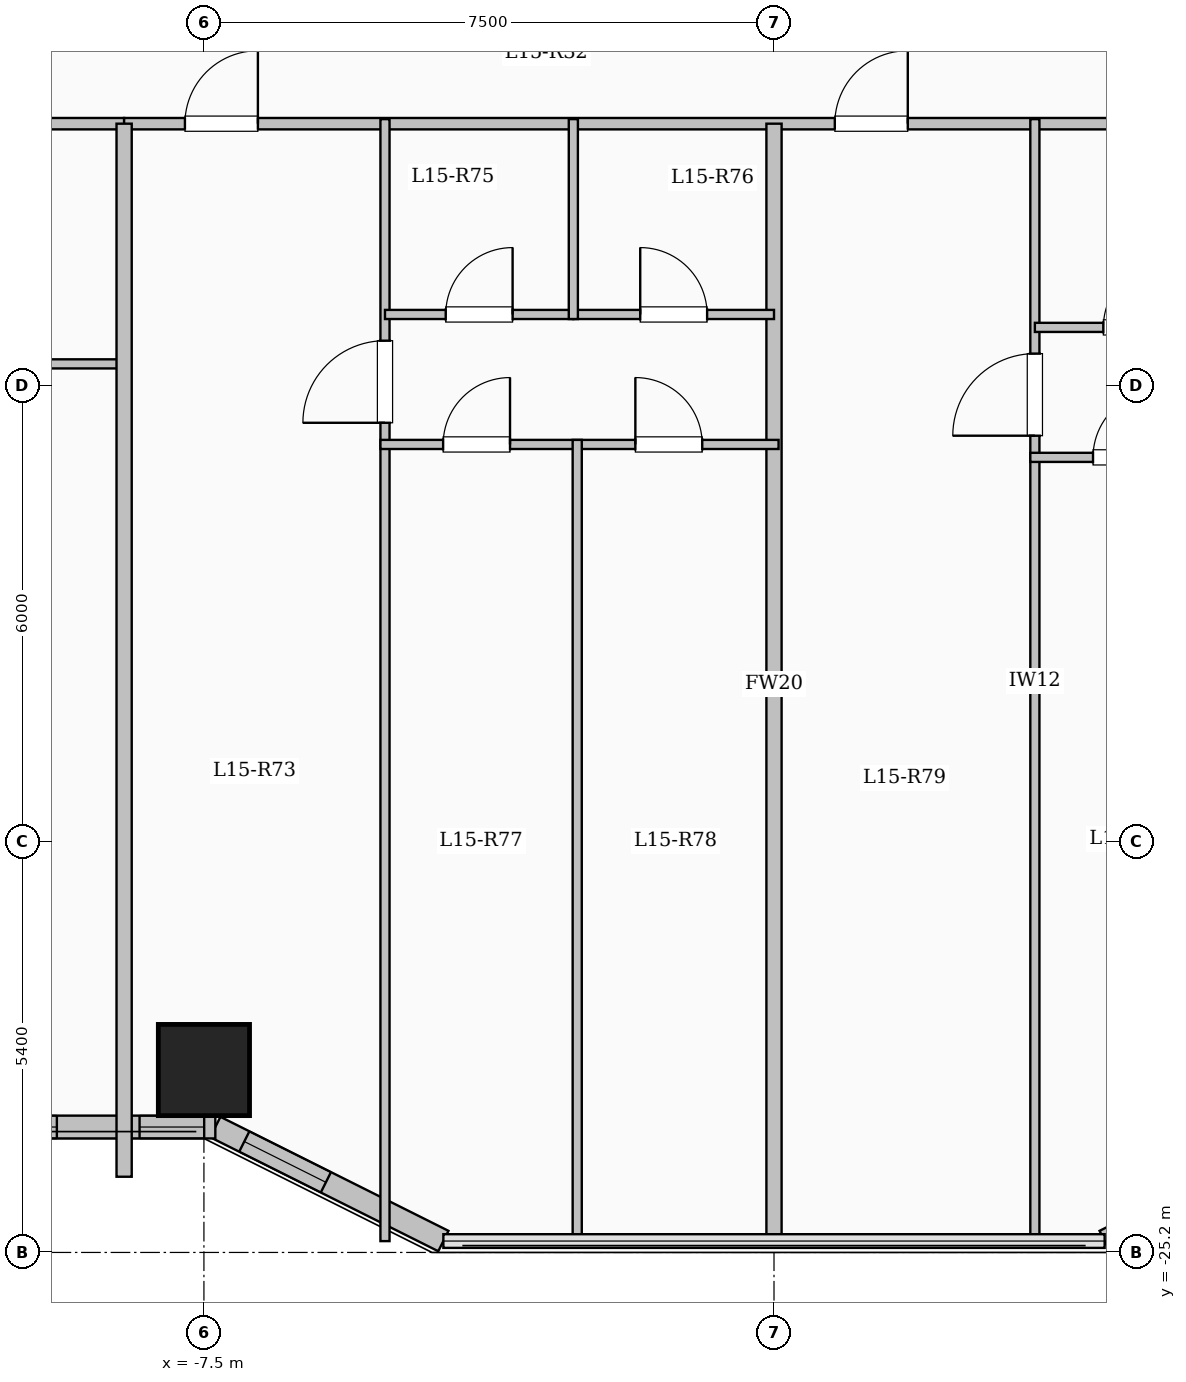
"""IFC4 building model, lengths in metres.
Left out: names, types, materials, properties, quantities, classifications, styles, units other than length and angle.
Written with IfcOpenShell. Run it as: python <this file> out.ifc"""

import sys

from ifc_helpers import new_model, si_unit, direction, frame, frame_2d, origin, origin_2d, place, context, subcontext, project, spatial, rectangle, extrude, element, fill, save


model = new_model("IFC4")
c1 = context("Model", 3, precision=1e-05, world=origin(), true_north=direction((0.0, 1.0)))
c2 = subcontext(c1, "Body", "Model", "MODEL_VIEW")
j1 = project(units=[si_unit("LENGTHUNIT", "METRE"), si_unit("PLANEANGLEUNIT", "RADIAN")], contexts=[c1])
p1 = place(None, origin())
s1 = spatial("IfcSite", under=j1, at=p1, CompositionType="ELEMENT")
p2 = place(p1, origin())
s2 = spatial("IfcBuilding", under=s1, at=p2, CompositionType="ELEMENT")
p3 = place(p2, frame((0.0, 0.0, 57.5)))
s3 = spatial("IfcBuildingStorey", under=s2, at=p3, CompositionType="ELEMENT", Elevation=57.5)
p4 = place(p3, frame((-7.5, -22.8, 0.0), z_axis=(0.0, 0.0, 1.0), x_axis=(1.0, 0.0, 0.0)))
e1 = element("IfcColumn", 1, at=p4, inside=s3, PredefinedType="COLUMN", context=c2, shape_type="SweptSolid", body=[
    extrude(rectangle(XDim=1.2, YDim=1.2, at=origin_2d()), origin(), (0.0, 0.0, 1.0), 3.35),
])
p5 = place(p3, frame((7.35, -23.55, 0.0), z_axis=(0.0, 0.0, 1.0), x_axis=(-0.894427191, -0.4472135955, 0.0)))
e2 = element("IfcWall", 2, at=p5, inside=s3, PredefinedType="SOLIDWALL", context=c2, shape_type="SweptSolid", body=[
    extrude(rectangle(XDim=3.354, YDim=0.3, at=frame_2d((1.677, 0.0))), origin(), (0.0, 0.0, 1.0), 3.1),
])
p6 = place(p5, frame((0.396, 0.0, 0.95)))
e3 = element("IfcOpeningElement", 3, at=p6, cuts=e2, PredefinedType="OPENING", context=c2, shape_type="SweptSolid", body=[
    extrude(rectangle(XDim=0.7, YDim=1.5, at=frame_2d((0.35, 0.75))), frame((0.0, 0.16, 0.0), z_axis=(0.0, -1.0, 0.0), x_axis=(1.0, 0.0, 0.0)), (0.0, 0.0, 1.0), 0.32),
])
p7 = place(p5, frame((2.282, 0.0, 0.95)))
e4 = element("IfcOpeningElement", 4, at=p7, cuts=e2, PredefinedType="OPENING", context=c2, shape_type="SweptSolid", body=[
    extrude(rectangle(XDim=0.7, YDim=1.5, at=frame_2d((0.35, 0.75))), frame((0.0, 0.16, 0.0), z_axis=(0.0, -1.0, 0.0), x_axis=(1.0, 0.0, 0.0)), (0.0, 0.0, 1.0), 0.32),
])
p8 = place(p3, frame((-4.35, -25.05, 0.0), z_axis=(0.0, 0.0, 1.0), x_axis=(-0.894427191, 0.4472135955, 0.0)))
e5 = element("IfcWall", 5, at=p8, inside=s3, PredefinedType="SOLIDWALL", context=c2, shape_type="SweptSolid", body=[
    extrude(rectangle(XDim=3.354, YDim=0.3, at=frame_2d((1.677, 0.0))), origin(), (0.0, 0.0, 1.0), 3.1),
])
p9 = place(p8, frame((1.728, 0.0, 0.95)))
e6 = element("IfcOpeningElement", 6, at=p9, cuts=e5, PredefinedType="OPENING", context=c2, shape_type="SweptSolid", body=[
    extrude(rectangle(XDim=1.2, YDim=1.5, at=frame_2d((0.6, 0.75))), frame((0.0, 0.16, 0.0), z_axis=(0.0, -1.0, 0.0), x_axis=(1.0, 0.0, 0.0)), (0.0, 0.0, 1.0), 0.32),
])
p10 = place(p3, frame((-7.35, -23.55, 0.0), z_axis=(0.0, 0.0, 1.0), x_axis=(-1.0, 0.0, 0.0)))
e7 = element("IfcWall", 7, at=p10, inside=s3, PredefinedType="SOLIDWALL", context=c2, shape_type="SweptSolid", body=[
    extrude(rectangle(XDim=15.3, YDim=0.3, at=frame_2d((7.65, 0.0))), origin(), (0.0, 0.0, 1.0), 3.1),
])
p11 = place(p10, frame((0.147, 0.0, 0.95)))
e8 = element("IfcOpeningElement", 8, at=p11, cuts=e7, PredefinedType="OPENING", context=c2, shape_type="SweptSolid", body=[
    extrude(rectangle(XDim=0.85, YDim=1.5, at=frame_2d((0.425, 0.75))), frame((0.0, 0.16, 0.0), z_axis=(0.0, -1.0, 0.0), x_axis=(1.0, 0.0, 0.0)), (0.0, 0.0, 1.0), 0.32),
])
p12 = place(p10, frame((2.085, 0.0, 0.9)))
e9 = element("IfcOpeningElement", 9, at=p12, cuts=e7, PredefinedType="OPENING", context=c2, shape_type="SweptSolid", body=[
    extrude(rectangle(XDim=1.8, YDim=1.65, at=frame_2d((0.9, 0.825))), frame((0.0, 0.16, 0.0), z_axis=(0.0, -1.0, 0.0), x_axis=(1.0, 0.0, 0.0)), (0.0, 0.0, 1.0), 0.32),
])
p13 = place(p10, frame((5.722, 0.0, 0.9)))
e10 = element("IfcOpeningElement", 10, at=p13, cuts=e7, PredefinedType="OPENING", context=c2, shape_type="SweptSolid", body=[
    extrude(rectangle(XDim=1.8, YDim=1.65, at=frame_2d((0.9, 0.825))), frame((0.0, 0.16, 0.0), z_axis=(0.0, -1.0, 0.0), x_axis=(1.0, 0.0, 0.0)), (0.0, 0.0, 1.0), 0.32),
])
p14 = place(p10, frame((9.358, 0.0, 0.9)))
e11 = element("IfcOpeningElement", 11, at=p14, cuts=e7, PredefinedType="OPENING", context=c2, shape_type="SweptSolid", body=[
    extrude(rectangle(XDim=1.5, YDim=1.65, at=frame_2d((0.75, 0.825))), frame((0.0, 0.16, 0.0), z_axis=(0.0, -1.0, 0.0), x_axis=(1.0, 0.0, 0.0)), (0.0, 0.0, 1.0), 0.32),
])
p15 = place(p10, frame((12.569, 0.0, 0.9)))
e12 = element("IfcOpeningElement", 12, at=p15, cuts=e7, PredefinedType="OPENING", context=c2, shape_type="SweptSolid", body=[
    extrude(rectangle(XDim=1.8, YDim=1.65, at=frame_2d((0.9, 0.825))), frame((0.0, 0.16, 0.0), z_axis=(0.0, -1.0, 0.0), x_axis=(1.0, 0.0, 0.0)), (0.0, 0.0, 1.0), 0.32),
])
p16 = place(p3, frame((-22.55, -10.35, 0.0), z_axis=(0.0, 0.0, 1.0), x_axis=(1.0, 0.0, 0.0)))
e13 = element("IfcWall", 13, at=p16, inside=s3, PredefinedType="PARTITIONING", context=c2, shape_type="SweptSolid", body=[
    extrude(rectangle(XDim=14.0, YDim=0.15, at=frame_2d((7.0, 0.0))), origin(), (0.0, 0.0, 1.0), 3.1),
])
p17 = place(p16, frame((0.7, 0.0, 0.0)))
e14 = element("IfcOpeningElement", 14, at=p17, cuts=e13, PredefinedType="OPENING", context=c2, shape_type="SweptSolid", body=[
    extrude(rectangle(XDim=0.96, YDim=2.15, at=frame_2d((0.48, 1.075))), frame((0.0, 0.085, 0.0), z_axis=(0.0, -1.0, 0.0), x_axis=(1.0, 0.0, 0.0)), (0.0, 0.0, 1.0), 0.17),
])
p18 = place(p16, frame((7.396, 0.0, 0.0)))
e15 = element("IfcOpeningElement", 15, at=p18, cuts=e13, PredefinedType="OPENING", context=c2, shape_type="SweptSolid", body=[
    extrude(rectangle(XDim=0.96, YDim=2.15, at=frame_2d((0.48, 1.075))), frame((0.0, 0.085, 0.0), z_axis=(0.0, -1.0, 0.0), x_axis=(1.0, 0.0, 0.0)), (0.0, 0.0, 1.0), 0.17),
])
p19 = place(p3, frame((-8.55, -10.35, 0.0), z_axis=(0.0, 0.0, 1.0), x_axis=(1.0, 0.0, 0.0)))
e16 = element("IfcWall", 16, at=p19, inside=s3, PredefinedType="PARTITIONING", context=c2, shape_type="SweptSolid", body=[
    extrude(rectangle(XDim=17.1, YDim=0.15, at=frame_2d((8.55, 0.0))), origin(), (0.0, 0.0, 1.0), 3.1),
])
p20 = place(p19, frame((0.8, 0.0, 0.0)))
e17 = element("IfcOpeningElement", 17, at=p20, cuts=e16, PredefinedType="OPENING", context=c2, shape_type="SweptSolid", body=[
    extrude(rectangle(XDim=0.96, YDim=2.15, at=frame_2d((0.48, 1.075))), frame((0.0, 0.085, 0.0), z_axis=(0.0, -1.0, 0.0), x_axis=(1.0, 0.0, 0.0)), (0.0, 0.0, 1.0), 0.17),
])
p21 = place(p19, frame((9.35, 0.0, 0.0)))
e18 = element("IfcOpeningElement", 18, at=p21, cuts=e16, PredefinedType="OPENING", context=c2, shape_type="SweptSolid", body=[
    extrude(rectangle(XDim=0.96, YDim=2.15, at=frame_2d((0.48, 1.075))), frame((0.0, 0.085, 0.0), z_axis=(0.0, -1.0, 0.0), x_axis=(1.0, 0.0, 0.0)), (0.0, 0.0, 1.0), 0.17),
])
p22 = place(p3, frame((-12.144, -13.51, 0.0), z_axis=(0.0, 0.0, 1.0), x_axis=(1.0, 0.0, 0.0)))
e19 = element("IfcWall", 19, at=p22, inside=s3, PredefinedType="PARTITIONING", context=c2, shape_type="SweptSolid", body=[
    extrude(rectangle(XDim=3.604, YDim=0.12, at=frame_2d((1.802, 0.0))), origin(), (0.0, 0.0, 1.0), 3.1),
])
p23 = place(p3, frame((-8.55, -24.204, 0.0), z_axis=(0.0, 0.0, 1.0), x_axis=(0.0, 1.0, 0.0)))
e20 = element("IfcWall", 20, at=p23, inside=s3, PredefinedType="SOLIDWALL", context=c2, shape_type="SweptSolid", body=[
    extrude(rectangle(XDim=13.854, YDim=0.2, at=frame_2d((6.927, 0.0))), origin(), (0.0, 0.0, 1.0), 3.1),
])
p24 = place(p3, frame((0.0, -25.08, 0.0), z_axis=(0.0, 0.0, 1.0), x_axis=(0.0, 1.0, 0.0)))
e21 = element("IfcWall", 21, at=p24, inside=s3, PredefinedType="SOLIDWALL", context=c2, shape_type="SweptSolid", body=[
    extrude(rectangle(XDim=14.73, YDim=0.2, at=frame_2d((7.365, 0.0))), origin(), (0.0, 0.0, 1.0), 3.1),
])
p25 = place(p3, frame((-5.118, -25.051, 0.0), z_axis=(0.0, 0.0, 1.0), x_axis=(0.0, 1.0, 0.0)))
e22 = element("IfcWall", 22, at=p25, inside=s3, PredefinedType="PARTITIONING", context=c2, shape_type="SweptSolid", body=[
    extrude(rectangle(XDim=14.761, YDim=0.12, at=frame_2d((7.38, 0.0))), origin(), (0.0, 0.0, 1.0), 3.1),
])
p26 = place(p25, frame((10.766, 0.0, 0.0)))
e23 = element("IfcOpeningElement", 23, at=p26, cuts=e22, PredefinedType="OPENING", context=c2, shape_type="SweptSolid", body=[
    extrude(rectangle(XDim=1.08, YDim=2.15, at=frame_2d((0.54, 1.075))), frame((0.0, 0.07, 0.0), z_axis=(0.0, -1.0, 0.0), x_axis=(1.0, 0.0, 0.0)), (0.0, 0.0, 1.0), 0.14),
])
p27 = place(p3, frame((-5.118, -12.86, 0.0), z_axis=(0.0, 0.0, 1.0), x_axis=(1.0, 0.0, 0.0)))
e24 = element("IfcWall", 24, at=p27, inside=s3, PredefinedType="PARTITIONING", context=c2, shape_type="SweptSolid", body=[
    extrude(rectangle(XDim=2.478, YDim=0.12, at=frame_2d((1.239, 0.0))), origin(), (0.0, 0.0, 1.0), 2.585),
])
p28 = place(p27, frame((0.799, 0.0, 0.0)))
e25 = element("IfcOpeningElement", 25, at=p28, cuts=e24, PredefinedType="OPENING", context=c2, shape_type="SweptSolid", body=[
    extrude(rectangle(XDim=0.88, YDim=2.1, at=frame_2d((0.44, 1.05))), frame((0.0, 0.07, 0.0), z_axis=(0.0, -1.0, 0.0), x_axis=(1.0, 0.0, 0.0)), (0.0, 0.0, 1.0), 0.14),
])
p29 = place(p3, frame((-2.64, -12.86, 0.0), z_axis=(0.0, 0.0, 1.0), x_axis=(1.0, 0.0, 0.0)))
e26 = element("IfcWall", 26, at=p29, inside=s3, PredefinedType="PARTITIONING", context=c2, shape_type="SweptSolid", body=[
    extrude(rectangle(XDim=2.64, YDim=0.12, at=frame_2d((1.32, 0.0))), origin(), (0.0, 0.0, 1.0), 2.585),
])
p30 = place(p29, frame((0.88, 0.0, 0.0)))
e27 = element("IfcOpeningElement", 27, at=p30, cuts=e26, PredefinedType="OPENING", context=c2, shape_type="SweptSolid", body=[
    extrude(rectangle(XDim=0.88, YDim=2.1, at=frame_2d((0.44, 1.05))), frame((0.0, 0.07, 0.0), z_axis=(0.0, -1.0, 0.0), x_axis=(1.0, 0.0, 0.0)), (0.0, 0.0, 1.0), 0.14),
])
p31 = place(p3, frame((-5.178, -14.57, 0.0), z_axis=(0.0, 0.0, 1.0), x_axis=(1.0, 0.0, 0.0)))
e28 = element("IfcWall", 28, at=p31, inside=s3, PredefinedType="PARTITIONING", context=c2, shape_type="SweptSolid", body=[
    extrude(rectangle(XDim=5.238, YDim=0.12, at=frame_2d((2.619, 0.0))), origin(), (0.0, 0.0, 1.0), 3.1),
])
p32 = place(p31, frame((0.825, 0.0, 0.0)))
e29 = element("IfcOpeningElement", 29, at=p32, cuts=e28, PredefinedType="OPENING", context=c2, shape_type="SweptSolid", body=[
    extrude(rectangle(XDim=0.88, YDim=2.1, at=frame_2d((0.44, 1.05))), frame((0.0, 0.07, 0.0), z_axis=(0.0, -1.0, 0.0), x_axis=(1.0, 0.0, 0.0)), (0.0, 0.0, 1.0), 0.14),
])
p33 = place(p31, frame((3.354, 0.0, 0.0)))
e30 = element("IfcOpeningElement", 30, at=p33, cuts=e28, PredefinedType="OPENING", context=c2, shape_type="SweptSolid", body=[
    extrude(rectangle(XDim=0.88, YDim=2.1, at=frame_2d((0.44, 1.05))), frame((0.0, 0.07, 0.0), z_axis=(0.0, -1.0, 0.0), x_axis=(1.0, 0.0, 0.0)), (0.0, 0.0, 1.0), 0.14),
])
p34 = place(p3, frame((-2.64, -12.92, 0.0), z_axis=(0.0, 0.0, 1.0), x_axis=(0.0, 1.0, 0.0)))
e31 = element("IfcWall", 31, at=p34, inside=s3, PredefinedType="PARTITIONING", context=c2, shape_type="SweptSolid", body=[
    extrude(rectangle(XDim=2.63, YDim=0.12, at=frame_2d((1.315, 0.0))), origin(), (0.0, 0.0, 1.0), 3.1),
])
p35 = place(p3, frame((-2.589, -25.08, 0.0), z_axis=(0.0, 0.0, 1.0), x_axis=(0.0, 1.0, 0.0)))
e32 = element("IfcWall", 32, at=p35, inside=s3, PredefinedType="PARTITIONING", context=c2, shape_type="SweptSolid", body=[
    extrude(rectangle(XDim=10.57, YDim=0.12, at=frame_2d((5.285, 0.0))), origin(), (0.0, 0.0, 1.0), 3.1),
])
p36 = place(p3, frame((3.432, -25.08, 0.0), z_axis=(0.0, 0.0, 1.0), x_axis=(0.0, 1.0, 0.0)))
e33 = element("IfcWall", 33, at=p36, inside=s3, PredefinedType="PARTITIONING", context=c2, shape_type="SweptSolid", body=[
    extrude(rectangle(XDim=14.79, YDim=0.12, at=frame_2d((7.395, 0.0))), origin(), (0.0, 0.0, 1.0), 3.1),
])
p37 = place(p36, frame((10.625, 0.0, 0.0)))
e34 = element("IfcOpeningElement", 34, at=p37, cuts=e33, PredefinedType="OPENING", context=c2, shape_type="SweptSolid", body=[
    extrude(rectangle(XDim=1.08, YDim=2.15, at=frame_2d((0.54, 1.075))), frame((0.0, 0.07, 0.0), z_axis=(0.0, -1.0, 0.0), x_axis=(1.0, 0.0, 0.0)), (0.0, 0.0, 1.0), 0.14),
])
p38 = place(p3, frame((3.432, -13.03, 0.0), z_axis=(0.0, 0.0, 1.0), x_axis=(1.0, 0.0, 0.0)))
e35 = element("IfcWall", 35, at=p38, inside=s3, PredefinedType="PARTITIONING", context=c2, shape_type="SweptSolid", body=[
    extrude(rectangle(XDim=2.681, YDim=0.12, at=frame_2d((1.341, 0.0))), origin(), (0.0, 0.0, 1.0), 2.585),
])
p39 = place(p38, frame((0.901, 0.0, 0.0)))
e36 = element("IfcOpeningElement", 36, at=p39, cuts=e35, PredefinedType="OPENING", context=c2, shape_type="SweptSolid", body=[
    extrude(rectangle(XDim=0.88, YDim=2.1, at=frame_2d((0.44, 1.05))), frame((0.0, 0.07, 0.0), z_axis=(0.0, -1.0, 0.0), x_axis=(1.0, 0.0, 0.0)), (0.0, 0.0, 1.0), 0.14),
])
p40 = place(p3, frame((3.372, -14.74, 0.0), z_axis=(0.0, 0.0, 1.0), x_axis=(1.0, 0.0, 0.0)))
e37 = element("IfcWall", 37, at=p40, inside=s3, PredefinedType="PARTITIONING", context=c2, shape_type="SweptSolid", body=[
    extrude(rectangle(XDim=5.238, YDim=0.12, at=frame_2d((2.619, 0.0))), origin(), (0.0, 0.0, 1.0), 2.585),
])
p41 = place(p40, frame((0.825, 0.0, 0.0)))
e38 = element("IfcOpeningElement", 38, at=p41, cuts=e37, PredefinedType="OPENING", context=c2, shape_type="SweptSolid", body=[
    extrude(rectangle(XDim=0.88, YDim=2.1, at=frame_2d((0.44, 1.05))), frame((0.0, 0.07, 0.0), z_axis=(0.0, -1.0, 0.0), x_axis=(1.0, 0.0, 0.0)), (0.0, 0.0, 1.0), 0.14),
])
p42 = place(p40, frame((3.353, 0.0, 0.0)))
e39 = element("IfcOpeningElement", 39, at=p42, cuts=e37, PredefinedType="OPENING", context=c2, shape_type="SweptSolid", body=[
    extrude(rectangle(XDim=0.88, YDim=2.1, at=frame_2d((0.44, 1.05))), frame((0.0, 0.07, 0.0), z_axis=(0.0, -1.0, 0.0), x_axis=(1.0, 0.0, 0.0)), (0.0, 0.0, 1.0), 0.14),
])
p43 = place(p9, origin())
e40 = element("IfcWindow", 40, at=p43, inside=s3, PartitioningType="SINGLE_PANEL", PredefinedType="WINDOW", context=c2, shape_type="SweptSolid", body=[
    extrude(rectangle(XDim=1.2, YDim=1.5, at=frame_2d((0.6, 0.75))), frame((0.0, 0.03, 0.0), z_axis=(0.0, -1.0, 0.0), x_axis=(1.0, 0.0, 0.0)), (0.0, 0.0, 1.0), 0.06),
])
fill(e6, e40)
p44 = place(p11, origin())
e41 = element("IfcWindow", 41, at=p44, inside=s3, PartitioningType="SINGLE_PANEL", PredefinedType="WINDOW", context=c2, shape_type="SweptSolid", body=[
    extrude(rectangle(XDim=0.85, YDim=1.5, at=frame_2d((0.425, 0.75))), frame((0.0, 0.03, 0.0), z_axis=(0.0, -1.0, 0.0), x_axis=(1.0, 0.0, 0.0)), (0.0, 0.0, 1.0), 0.06),
])
fill(e8, e41)
p45 = place(p12, origin())
e42 = element("IfcWindow", 42, at=p45, inside=s3, PartitioningType="SINGLE_PANEL", PredefinedType="WINDOW", context=c2, shape_type="SweptSolid", body=[
    extrude(rectangle(XDim=1.8, YDim=1.65, at=frame_2d((0.9, 0.825))), frame((0.0, 0.03, 0.0), z_axis=(0.0, -1.0, 0.0), x_axis=(1.0, 0.0, 0.0)), (0.0, 0.0, 1.0), 0.06),
])
fill(e9, e42)
p46 = place(p20, origin())
e43 = element("IfcDoor", 43, at=p46, inside=s3, OperationType="SINGLE_SWING_RIGHT", PredefinedType="DOOR", context=c2, shape_type="SweptSolid", body=[
    extrude(rectangle(XDim=0.96, YDim=2.15, at=frame_2d((0.48, 1.075))), frame((0.0, 0.025, 0.0), z_axis=(0.0, -1.0, 0.0), x_axis=(1.0, 0.0, 0.0)), (0.0, 0.0, 1.0), 0.05),
])
fill(e17, e43)
p47 = place(p26, origin())
e44 = element("IfcDoor", 44, at=p47, inside=s3, OperationType="SINGLE_SWING_LEFT", PredefinedType="DOOR", context=c2, shape_type="SweptSolid", body=[
    extrude(rectangle(XDim=1.08, YDim=2.15, at=frame_2d((0.54, 1.075))), frame((0.0, 0.025, 0.0), z_axis=(0.0, -1.0, 0.0), x_axis=(1.0, 0.0, 0.0)), (0.0, 0.0, 1.0), 0.05),
])
fill(e23, e44)
p48 = place(p28, origin())
e45 = element("IfcDoor", 45, at=p48, inside=s3, OperationType="SINGLE_SWING_RIGHT", PredefinedType="DOOR", context=c2, shape_type="SweptSolid", body=[
    extrude(rectangle(XDim=0.88, YDim=2.1, at=frame_2d((0.44, 1.05))), frame((0.0, 0.025, 0.0), z_axis=(0.0, -1.0, 0.0), x_axis=(1.0, 0.0, 0.0)), (0.0, 0.0, 1.0), 0.05),
])
fill(e25, e45)
p49 = place(p30, origin())
e46 = element("IfcDoor", 46, at=p49, inside=s3, OperationType="SINGLE_SWING_LEFT", PredefinedType="DOOR", context=c2, shape_type="SweptSolid", body=[
    extrude(rectangle(XDim=0.88, YDim=2.1, at=frame_2d((0.44, 1.05))), frame((0.0, 0.025, 0.0), z_axis=(0.0, -1.0, 0.0), x_axis=(1.0, 0.0, 0.0)), (0.0, 0.0, 1.0), 0.05),
])
fill(e27, e46)
p50 = place(p32, origin())
e47 = element("IfcDoor", 47, at=p50, inside=s3, OperationType="SINGLE_SWING_RIGHT", PredefinedType="DOOR", context=c2, shape_type="SweptSolid", body=[
    extrude(rectangle(XDim=0.88, YDim=2.1, at=frame_2d((0.44, 1.05))), frame((0.0, 0.025, 0.0), z_axis=(0.0, -1.0, 0.0), x_axis=(1.0, 0.0, 0.0)), (0.0, 0.0, 1.0), 0.05),
])
fill(e29, e47)
p51 = place(p33, origin())
e48 = element("IfcDoor", 48, at=p51, inside=s3, OperationType="SINGLE_SWING_LEFT", PredefinedType="DOOR", context=c2, shape_type="SweptSolid", body=[
    extrude(rectangle(XDim=0.88, YDim=2.1, at=frame_2d((0.44, 1.05))), frame((0.0, 0.025, 0.0), z_axis=(0.0, -1.0, 0.0), x_axis=(1.0, 0.0, 0.0)), (0.0, 0.0, 1.0), 0.05),
])
fill(e30, e48)
p52 = place(p21, origin())
e49 = element("IfcDoor", 49, at=p52, inside=s3, OperationType="SINGLE_SWING_RIGHT", PredefinedType="DOOR", context=c2, shape_type="SweptSolid", body=[
    extrude(rectangle(XDim=0.96, YDim=2.15, at=frame_2d((0.48, 1.075))), frame((0.0, 0.025, 0.0), z_axis=(0.0, -1.0, 0.0), x_axis=(1.0, 0.0, 0.0)), (0.0, 0.0, 1.0), 0.05),
])
fill(e18, e49)
p53 = place(p37, origin())
e50 = element("IfcDoor", 50, at=p53, inside=s3, OperationType="SINGLE_SWING_LEFT", PredefinedType="DOOR", context=c2, shape_type="SweptSolid", body=[
    extrude(rectangle(XDim=1.08, YDim=2.15, at=frame_2d((0.54, 1.075))), frame((0.0, 0.025, 0.0), z_axis=(0.0, -1.0, 0.0), x_axis=(1.0, 0.0, 0.0)), (0.0, 0.0, 1.0), 0.05),
])
fill(e34, e50)
p54 = place(p39, origin())
e51 = element("IfcDoor", 51, at=p54, inside=s3, OperationType="SINGLE_SWING_RIGHT", PredefinedType="DOOR", context=c2, shape_type="SweptSolid", body=[
    extrude(rectangle(XDim=0.88, YDim=2.1, at=frame_2d((0.44, 1.05))), frame((0.0, 0.025, 0.0), z_axis=(0.0, -1.0, 0.0), x_axis=(1.0, 0.0, 0.0)), (0.0, 0.0, 1.0), 0.05),
])
fill(e36, e51)
p55 = place(p41, origin())
e52 = element("IfcDoor", 52, at=p55, inside=s3, OperationType="SINGLE_SWING_RIGHT", PredefinedType="DOOR", context=c2, shape_type="SweptSolid", body=[
    extrude(rectangle(XDim=0.88, YDim=2.1, at=frame_2d((0.44, 1.05))), frame((0.0, 0.025, 0.0), z_axis=(0.0, -1.0, 0.0), x_axis=(1.0, 0.0, 0.0)), (0.0, 0.0, 1.0), 0.05),
])
fill(e38, e52)
save(model, sys.argv[1])
